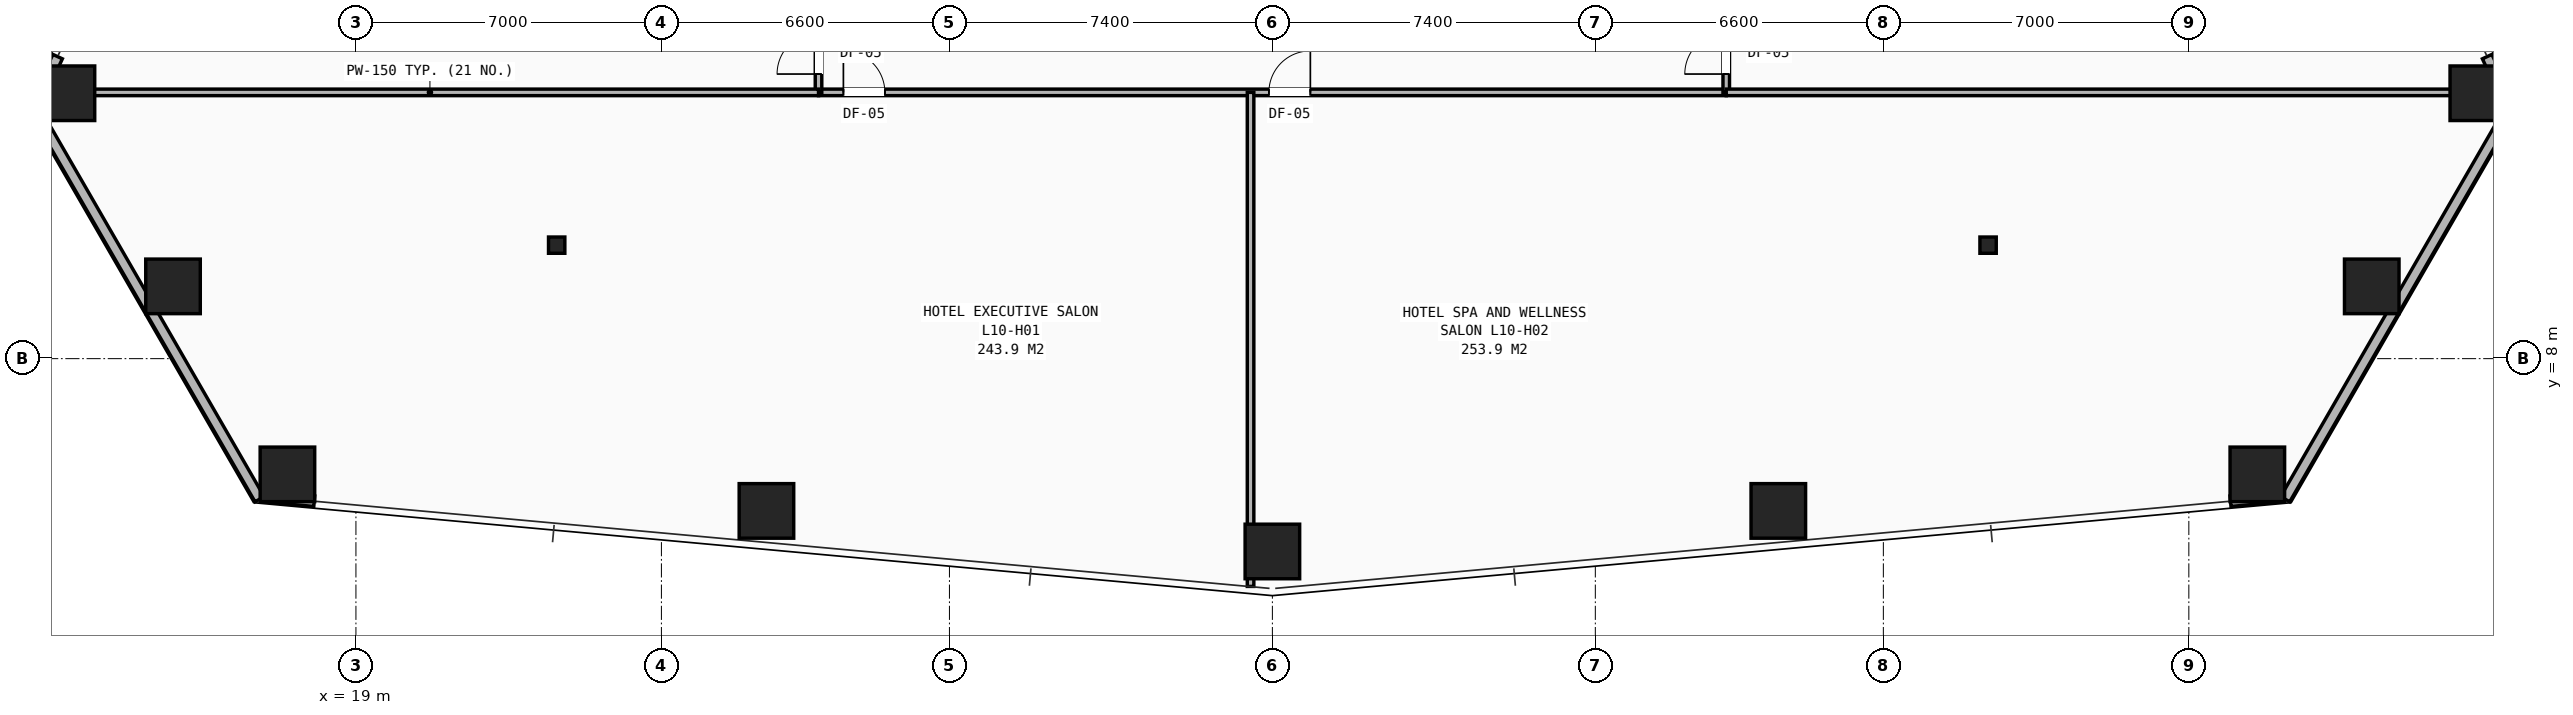
"""IFC4 building model, lengths in metres.
Left out: names, types, materials, properties, quantities, classifications, styles, units other than length and angle.
Written with IfcOpenShell. Run it as: python <this file> out.ifc"""

import sys

from ifc_helpers import new_model, si_unit, direction, frame, frame_2d, origin, origin_2d, place, context, subcontext, project, spatial, rectangle, hollow_rectangle, i_section, extrude, element, fill, save


model = new_model("IFC4")
c1 = context("Model", 3, precision=1e-05, world=origin(), true_north=direction((0.0, 1.0)))
c2 = subcontext(c1, "Body", "Model", "MODEL_VIEW")
j1 = project(units=[si_unit("LENGTHUNIT", "METRE"), si_unit("PLANEANGLEUNIT", "RADIAN")], contexts=[c1])
p1 = place(None, origin())
s1 = spatial("IfcSite", under=j1, at=p1, CompositionType="ELEMENT")
p2 = place(p1, origin())
s2 = spatial("IfcBuilding", under=s1, at=p2, CompositionType="ELEMENT")
p3 = place(p2, frame((0.0, 0.0, 40.0)))
s3 = spatial("IfcBuildingStorey", under=s2, at=p3, CompositionType="ELEMENT", Elevation=40.0)
for number, where, z_axis, x_axis in (
    (1, (23.6, 10.6, 0.0), (0.0, 0.0, 1.0), (1.0, 0.0, 0.0)),
    (2, (56.4, 10.6, 0.0), (0.0, 0.0, 1.0), (1.0, 0.0, 0.0)),
):
    element("IfcColumn", number, at=place(p3, frame(where, z_axis=z_axis, x_axis=x_axis)), inside=s3, PredefinedType="COLUMN", context=c2, shape_type="SweptSolid", body=[
        extrude(i_section(OverallWidth=0.374, OverallDepth=0.372, WebThickness=0.016, FlangeThickness=0.026, at=origin_2d()), origin(), (0.0, 0.0, 1.0), 3.2),
    ])
for number, where, z_axis, x_axis in (
    (3, (12.389, 14.08, 0.0), (0.0, 0.0, 1.0), (1.0, 0.0, 0.0)),
    (4, (14.809, 9.656, 0.0), (0.0, 0.0, 1.0), (1.0, 0.0, 0.0)),
    (5, (17.43, 5.349, 0.0), (0.0, 0.0, 1.0), (1.0, 0.0, 0.0)),
    (6, (28.407, 4.512, 0.0), (0.0, 0.0, 1.0), (1.0, 0.0, 0.0)),
    (7, (40.0, 3.583, 0.0), (0.0, 0.0, 1.0), (1.0, 0.0, 0.0)),
    (8, (51.593, 4.512, 0.0), (0.0, 0.0, 1.0), (1.0, 0.0, 0.0)),
    (9, (62.57, 5.349, 0.0), (0.0, 0.0, 1.0), (1.0, 0.0, 0.0)),
    (10, (65.191, 9.656, 0.0), (0.0, 0.0, 1.0), (1.0, 0.0, 0.0)),
    (11, (67.611, 14.08, 0.0), (0.0, 0.0, 1.0), (1.0, 0.0, 0.0)),
):
    element("IfcColumn", number, at=place(p3, frame(where, z_axis=z_axis, x_axis=x_axis)), inside=s3, PredefinedType="COLUMN", context=c2, shape_type="SweptSolid", body=[
        extrude(hollow_rectangle(XDim=1.25, YDim=1.25, WallThickness=0.08, at=origin_2d()), origin(), (0.0, 0.0, 1.0), 3.2),
    ])
p4 = place(p3, frame((12.164, 14.919, 0.0), z_axis=(0.0, 0.0, 1.0), x_axis=(-0.419364442242, -0.907817968859, 0.0)))
e12 = element("IfcWall", 12, at=p4, inside=s3, PredefinedType="SHEAR", context=c2, shape_type="SweptSolid", body=[
    extrude(rectangle(XDim=1.163, YDim=0.24, at=frame_2d((0.581, 0.0))), origin(), (0.0, 0.0, 1.0), 2.263),
])
p5 = place(p3, frame((16.792, 4.78, 0.0), z_axis=(0.0, 0.0, 1.0), x_axis=(-0.500011568057, 0.866018724861, 0.0)))
e13 = element("IfcWall", 13, at=p5, inside=s3, PredefinedType="SHEAR", context=c2, shape_type="SweptSolid", body=[
    extrude(rectangle(XDim=10.428, YDim=0.24, at=frame_2d((5.214, 0.0))), origin(), (0.0, 0.0, 1.0), 2.263),
])
for number, where, z_axis, x_axis in (
    (14, (16.887, 4.839, 0.0), (0.0, 0.0, 1.0), (0.996, -0.091, 0.0)),
    (15, (61.955, 4.734, 0.0), (0.0, 0.0, 1.0), (0.996, 0.091, 0.0)),
):
    element("IfcWall", number, at=place(p3, frame(where, z_axis=z_axis, x_axis=x_axis)), inside=s3, PredefinedType="SHEAR", context=c2, shape_type="SweptSolid", body=[
        extrude(rectangle(XDim=1.163, YDim=0.24, at=frame_2d((0.581, 0.0))), origin(), (0.0, 0.0, 1.0), 2.263),
    ])
p6 = place(p3, frame((68.422, 13.811, 0.0), z_axis=(0.0, 0.0, 1.0), x_axis=(-0.500011568057, -0.866018724861, 0.0)))
e16 = element("IfcWall", 16, at=p6, inside=s3, PredefinedType="SHEAR", context=c2, shape_type="SweptSolid", body=[
    extrude(rectangle(XDim=10.428, YDim=0.24, at=frame_2d((5.214, 0.0))), origin(), (0.0, 0.0, 1.0), 2.263),
])
p7 = place(p3, frame((68.323, 13.864, 0.0), z_axis=(0.0, 0.0, 1.0), x_axis=(-0.419364442242, 0.907817968859, 0.0)))
e17 = element("IfcWall", 17, at=p7, inside=s3, PredefinedType="SHEAR", context=c2, shape_type="SweptSolid", body=[
    extrude(rectangle(XDim=1.163, YDim=0.24, at=frame_2d((0.581, 0.0))), origin(), (0.0, 0.0, 1.0), 2.263),
])
p8 = place(p3, frame((29.6, 14.1, 0.0), z_axis=(0.0, 0.0, 1.0), x_axis=(1.0, 0.0, 0.0)))
e18 = element("IfcWall", 18, at=p8, inside=s3, PredefinedType="PARTITIONING", context=c2, shape_type="SweptSolid", body=[
    extrude(rectangle(XDim=20.8, YDim=0.15, at=frame_2d((10.4, 0.0))), origin(), (0.0, 0.0, 1.0), 2.431),
])
p9 = place(p8, frame((0.57, 0.0, 0.0)))
e19 = element("IfcOpeningElement", 19, at=p9, cuts=e18, PredefinedType="OPENING", context=c2, shape_type="SweptSolid", body=[
    extrude(rectangle(XDim=0.95, YDim=2.1, at=frame_2d((0.475, 1.05))), frame((0.0, 0.085, 0.0), z_axis=(0.0, -1.0, 0.0), x_axis=(1.0, 0.0, 0.0)), (0.0, 0.0, 1.0), 0.17),
])
p10 = place(p8, frame((10.32, 0.0, 0.0)))
e20 = element("IfcOpeningElement", 20, at=p10, cuts=e18, PredefinedType="OPENING", context=c2, shape_type="SweptSolid", body=[
    extrude(rectangle(XDim=0.95, YDim=2.1, at=frame_2d((0.475, 1.05))), frame((0.0, 0.085, 0.0), z_axis=(0.0, -1.0, 0.0), x_axis=(1.0, 0.0, 0.0)), (0.0, 0.0, 1.0), 0.17),
])
p11 = place(p3, frame((29.6, 14.1, 0.0), z_axis=(0.0, 0.0, 1.0), x_axis=(0.0, 1.0, 0.0)))
e21 = element("IfcWall", 21, at=p11, inside=s3, PredefinedType="PARTITIONING", context=c2, shape_type="SweptSolid", body=[
    extrude(rectangle(XDim=21.9, YDim=0.15, at=frame_2d((10.95, 0.0))), origin(), (0.0, 0.0, 1.0), 2.431),
])
p12 = place(p11, frame((0.42, 0.0, 0.0)))
e22 = element("IfcOpeningElement", 22, at=p12, cuts=e21, PredefinedType="OPENING", context=c2, shape_type="SweptSolid", body=[
    extrude(rectangle(XDim=0.95, YDim=2.1, at=frame_2d((0.475, 1.05))), frame((0.0, 0.085, 0.0), z_axis=(0.0, -1.0, 0.0), x_axis=(1.0, 0.0, 0.0)), (0.0, 0.0, 1.0), 0.17),
])
p13 = place(p11, frame((11.32, 0.0, 0.0)))
e23 = element("IfcOpeningElement", 23, at=p13, cuts=e21, PredefinedType="OPENING", context=c2, shape_type="SweptSolid", body=[
    extrude(rectangle(XDim=0.95, YDim=2.1, at=frame_2d((0.475, 1.05))), frame((0.0, 0.085, 0.0), z_axis=(0.0, -1.0, 0.0), x_axis=(1.0, 0.0, 0.0)), (0.0, 0.0, 1.0), 0.17),
])
p14 = place(p3, frame((50.4, 14.1, 0.0), z_axis=(0.0, 0.0, 1.0), x_axis=(0.0, 1.0, 0.0)))
e24 = element("IfcWall", 24, at=p14, inside=s3, PredefinedType="PARTITIONING", context=c2, shape_type="SweptSolid", body=[
    extrude(rectangle(XDim=21.9, YDim=0.15, at=frame_2d((10.95, 0.0))), origin(), (0.0, 0.0, 1.0), 2.431),
])
p15 = place(p14, frame((0.42, 0.0, 0.0)))
e25 = element("IfcOpeningElement", 25, at=p15, cuts=e24, PredefinedType="OPENING", context=c2, shape_type="SweptSolid", body=[
    extrude(rectangle(XDim=0.95, YDim=2.1, at=frame_2d((0.475, 1.05))), frame((0.0, 0.085, 0.0), z_axis=(0.0, -1.0, 0.0), x_axis=(1.0, 0.0, 0.0)), (0.0, 0.0, 1.0), 0.17),
])
p16 = place(p14, frame((7.32, 0.0, 0.0)))
e26 = element("IfcOpeningElement", 26, at=p16, cuts=e24, PredefinedType="OPENING", context=c2, shape_type="SweptSolid", body=[
    extrude(rectangle(XDim=0.95, YDim=2.1, at=frame_2d((0.475, 1.05))), frame((0.0, 0.085, 0.0), z_axis=(0.0, -1.0, 0.0), x_axis=(1.0, 0.0, 0.0)), (0.0, 0.0, 1.0), 0.17),
])
p17 = place(p14, frame((15.82, 0.0, 0.0)))
e27 = element("IfcOpeningElement", 27, at=p17, cuts=e24, PredefinedType="OPENING", context=c2, shape_type="SweptSolid", body=[
    extrude(rectangle(XDim=0.95, YDim=2.1, at=frame_2d((0.475, 1.05))), frame((0.0, 0.085, 0.0), z_axis=(0.0, -1.0, 0.0), x_axis=(1.0, 0.0, 0.0)), (0.0, 0.0, 1.0), 0.17),
])
p18 = place(p3, frame((39.5, 2.782, 0.0), z_axis=(0.0, 0.0, 1.0), x_axis=(0.0, 1.0, 0.0)))
e28 = element("IfcWall", 28, at=p18, inside=s3, PredefinedType="PARTITIONING", context=c2, shape_type="SweptSolid", body=[
    extrude(rectangle(XDim=11.318, YDim=0.15, at=frame_2d((5.659, 0.0))), origin(), (0.0, 0.0, 1.0), 2.268),
])
for number, where, z_axis, x_axis in (
    (29, (11.791, 14.1, 0.0), (0.0, 0.0, 1.0), (1.0, 0.0, 0.0)),
    (30, (50.4, 14.1, 0.0), (0.0, 0.0, 1.0), (1.0, 0.0, 0.0)),
):
    element("IfcWall", number, at=place(p3, frame(where, z_axis=z_axis, x_axis=x_axis)), inside=s3, PredefinedType="PARTITIONING", context=c2, shape_type="SweptSolid", body=[
        extrude(rectangle(XDim=17.809, YDim=0.15, at=frame_2d((8.904, 0.0))), origin(), (0.0, 0.0, 1.0), 2.268),
    ])
p19 = place(p9, origin())
e31 = element("IfcDoor", 31, at=p19, inside=s3, OperationType="SINGLE_SWING_LEFT", PredefinedType="DOOR", context=c2, shape_type="SweptSolid", body=[
    extrude(rectangle(XDim=0.95, YDim=2.1, at=frame_2d((0.475, 1.05))), frame((0.0, 0.025, 0.0), z_axis=(0.0, -1.0, 0.0), x_axis=(1.0, 0.0, 0.0)), (0.0, 0.0, 1.0), 0.05),
])
fill(e19, e31)
p20 = place(p10, origin())
e32 = element("IfcDoor", 32, at=p20, inside=s3, OperationType="SINGLE_SWING_RIGHT", PredefinedType="DOOR", context=c2, shape_type="SweptSolid", body=[
    extrude(rectangle(XDim=0.95, YDim=2.1, at=frame_2d((0.475, 1.05))), frame((0.0, 0.025, 0.0), z_axis=(0.0, -1.0, 0.0), x_axis=(1.0, 0.0, 0.0)), (0.0, 0.0, 1.0), 0.05),
])
fill(e20, e32)
p21 = place(p12, origin())
e33 = element("IfcDoor", 33, at=p21, inside=s3, OperationType="SINGLE_SWING_LEFT", PredefinedType="DOOR", context=c2, shape_type="SweptSolid", body=[
    extrude(rectangle(XDim=0.95, YDim=2.1, at=frame_2d((0.475, 1.05))), frame((0.0, 0.025, 0.0), z_axis=(0.0, -1.0, 0.0), x_axis=(1.0, 0.0, 0.0)), (0.0, 0.0, 1.0), 0.05),
])
fill(e22, e33)
p22 = place(p15, origin())
e34 = element("IfcDoor", 34, at=p22, inside=s3, OperationType="SINGLE_SWING_LEFT", PredefinedType="DOOR", context=c2, shape_type="SweptSolid", body=[
    extrude(rectangle(XDim=0.95, YDim=2.1, at=frame_2d((0.475, 1.05))), frame((0.0, 0.025, 0.0), z_axis=(0.0, -1.0, 0.0), x_axis=(1.0, 0.0, 0.0)), (0.0, 0.0, 1.0), 0.05),
])
fill(e25, e34)
save(model, sys.argv[1])
